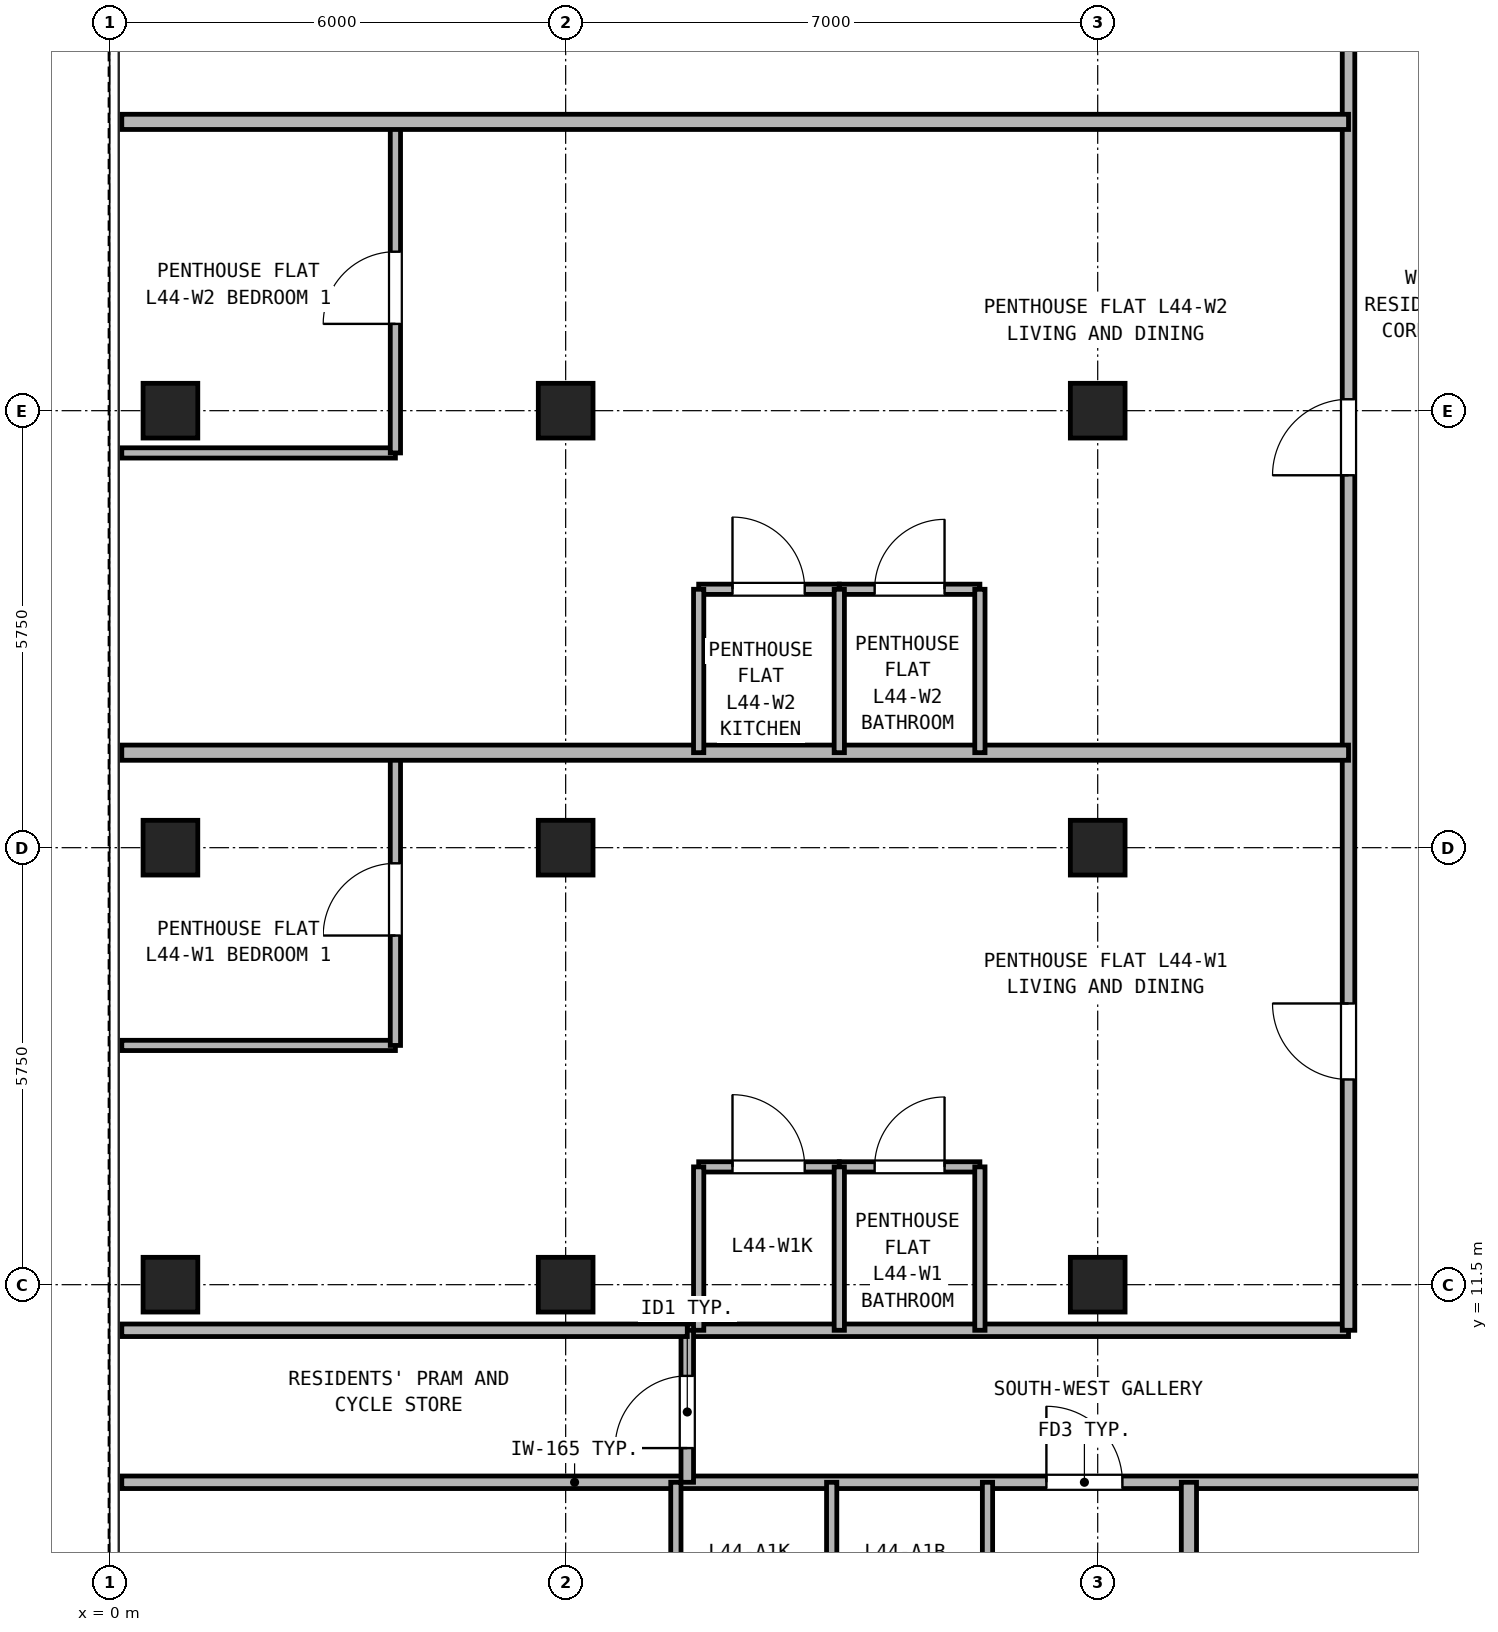
"""IFC4 building model, lengths in metres.
Left out: names, types, materials, properties, quantities, classifications, styles, units other than length and angle.
Written with IfcOpenShell. Run it as: python <this file> out.ifc"""

import sys

from ifc_helpers import new_model, si_unit, direction, frame, frame_2d, origin, origin_2d, place, context, subcontext, project, spatial, rectangle, hollow_rectangle, extrude, source, transform, mapped, element, fill, save


model = new_model("IFC4")
c1 = context("Model", 3, precision=1e-05, world=origin(), true_north=direction((0.0, 1.0)))
c2 = subcontext(c1, "Body", "Model", "MODEL_VIEW")
j1 = project(units=[si_unit("LENGTHUNIT", "METRE"), si_unit("PLANEANGLEUNIT", "RADIAN")], contexts=[c1])
p1 = place(None, origin())
s1 = spatial("IfcSite", under=j1, at=p1, CompositionType="ELEMENT")
p2 = place(p1, origin())
s2 = spatial("IfcBuilding", under=s1, at=p2, CompositionType="ELEMENT")
p3 = place(p2, frame((0.0, 0.0, 159.3)))
s3 = spatial("IfcBuildingStorey", under=s2, at=p3, CompositionType="ELEMENT", Elevation=159.3)
m1 = source(origin(), c2, "Body", "SweptSolid", [
    extrude(hollow_rectangle(XDim=0.72, YDim=0.72, WallThickness=0.04, at=origin_2d()), origin(), (0.0, 0.0, 1.0), 2.95),
])
for number, where, z_axis, x_axis in (
    (1, (0.8, 11.5, 0.0), (0.0, 0.0, 1.0), (1.0, 0.0, 0.0)),
    (2, (0.8, 17.25, 0.0), (0.0, 0.0, 1.0), (1.0, 0.0, 0.0)),
    (3, (0.8, 23.0, 0.0), (0.0, 0.0, 1.0), (1.0, 0.0, 0.0)),
    (4, (6.0, 11.5, 0.0), (0.0, 0.0, 1.0), (1.0, 0.0, 0.0)),
    (5, (6.0, 17.25, 0.0), (0.0, 0.0, 1.0), (1.0, 0.0, 0.0)),
    (6, (6.0, 23.0, 0.0), (0.0, 0.0, 1.0), (1.0, 0.0, 0.0)),
    (7, (13.0, 11.5, 0.0), (0.0, 0.0, 1.0), (1.0, 0.0, 0.0)),
    (8, (13.0, 17.25, 0.0), (0.0, 0.0, 1.0), (1.0, 0.0, 0.0)),
    (9, (13.0, 23.0, 0.0), (0.0, 0.0, 1.0), (1.0, 0.0, 0.0)),
):
    element("IfcColumn", number, at=place(p3, frame(where, z_axis=z_axis, x_axis=x_axis)), inside=s3, PredefinedType="COLUMN", context=c2, shape_type="MappedRepresentation", body=[
        mapped(m1, transform((0.0, 0.0, 0.0), x_axis=(1.0, 0.0, 0.0), y_axis=(0.0, 1.0, 0.0), z_axis=(0.0, 0.0, 1.0), scale=1.0)),
    ])
p4 = place(p3, frame((0.16, 8.9, 0.0), z_axis=(0.0, 0.0, 1.0), x_axis=(1.0, 0.0, 0.0)))
e10 = element("IfcWall", 10, at=p4, inside=s3, PredefinedType="PARTITIONING", context=c2, shape_type="SweptSolid", body=[
    extrude(rectangle(XDim=41.48, YDim=0.165, at=frame_2d((20.74, 0.0))), origin(), (0.0, 0.0, 1.0), 2.95),
])
p5 = place(p4, frame((12.165, 0.0, 0.0)))
e11 = element("IfcOpeningElement", 11, at=p5, cuts=e10, PredefinedType="OPENING", context=c2, shape_type="SweptSolid", body=[
    extrude(rectangle(XDim=1.0, YDim=2.15, at=frame_2d((0.5, 1.075))), frame((0.0, 0.093, 0.0), z_axis=(0.0, -1.0, 0.0), x_axis=(1.0, 0.0, 0.0)), (0.0, 0.0, 1.0), 0.185),
])
p6 = place(p4, frame((17.965, 0.0, 0.0)))
e12 = element("IfcOpeningElement", 12, at=p6, cuts=e10, PredefinedType="OPENING", context=c2, shape_type="SweptSolid", body=[
    extrude(rectangle(XDim=1.0, YDim=2.15, at=frame_2d((0.5, 1.075))), frame((0.0, 0.093, 0.0), z_axis=(0.0, -1.0, 0.0), x_axis=(1.0, 0.0, 0.0)), (0.0, 0.0, 1.0), 0.185),
])
p7 = place(p4, frame((31.115, 0.0, 0.0)))
e13 = element("IfcOpeningElement", 13, at=p7, cuts=e10, PredefinedType="OPENING", context=c2, shape_type="SweptSolid", body=[
    extrude(rectangle(XDim=1.0, YDim=2.15, at=frame_2d((0.5, 1.075))), frame((0.0, 0.093, 0.0), z_axis=(0.0, -1.0, 0.0), x_axis=(1.0, 0.0, 0.0)), (0.0, 0.0, 1.0), 0.185),
])
p8 = place(p3, frame((7.6, 10.9, 0.0), z_axis=(0.0, 0.0, 1.0), x_axis=(1.0, 0.0, 0.0)))
e14 = element("IfcWall", 14, at=p8, inside=s3, PredefinedType="PARTITIONING", context=c2, shape_type="SweptSolid", body=[
    extrude(rectangle(XDim=8.7, YDim=0.165, at=frame_2d((4.35, 0.0))), origin(), (0.0, 0.0, 1.0), 2.95),
])
p9 = place(p3, frame((7.6, 8.9, 0.0), z_axis=(0.0, 0.0, 1.0), x_axis=(0.0, 1.0, 0.0)))
e15 = element("IfcWall", 15, at=p9, inside=s3, PredefinedType="PARTITIONING", context=c2, shape_type="SweptSolid", body=[
    extrude(rectangle(XDim=2.0, YDim=0.165, at=frame_2d((1.0, 0.0))), origin(), (0.0, 0.0, 1.0), 2.95),
])
p10 = place(p9, frame((0.45, 0.0, 0.0)))
e16 = element("IfcOpeningElement", 16, at=p10, cuts=e15, PredefinedType="OPENING", context=c2, shape_type="SweptSolid", body=[
    extrude(rectangle(XDim=0.95, YDim=2.15, at=frame_2d((0.475, 1.075))), frame((0.0, 0.093, 0.0), z_axis=(0.0, -1.0, 0.0), x_axis=(1.0, 0.0, 0.0)), (0.0, 0.0, 1.0), 0.185),
])
p11 = place(p3, frame((16.3, 10.9, 0.0), z_axis=(0.0, 0.0, 1.0), x_axis=(0.0, 1.0, 0.0)))
e17 = element("IfcWall", 17, at=p11, inside=s3, PredefinedType="PARTITIONING", context=c2, shape_type="SweptSolid", body=[
    extrude(rectangle(XDim=24.24, YDim=0.165, at=frame_2d((12.12, 0.0))), origin(), (0.0, 0.0, 1.0), 2.95),
])
p12 = place(p11, frame((3.3, 0.0, 0.0)))
e18 = element("IfcOpeningElement", 18, at=p12, cuts=e17, PredefinedType="OPENING", context=c2, shape_type="SweptSolid", body=[
    extrude(rectangle(XDim=1.0, YDim=2.15, at=frame_2d((0.5, 1.075))), frame((0.0, 0.093, 0.0), z_axis=(0.0, -1.0, 0.0), x_axis=(1.0, 0.0, 0.0)), (0.0, 0.0, 1.0), 0.185),
])
p13 = place(p11, frame((11.25, 0.0, 0.0)))
e19 = element("IfcOpeningElement", 19, at=p13, cuts=e17, PredefinedType="OPENING", context=c2, shape_type="SweptSolid", body=[
    extrude(rectangle(XDim=1.0, YDim=2.15, at=frame_2d((0.5, 1.075))), frame((0.0, 0.093, 0.0), z_axis=(0.0, -1.0, 0.0), x_axis=(1.0, 0.0, 0.0)), (0.0, 0.0, 1.0), 0.185),
])
p14 = place(p11, frame((17.2, 0.0, 0.0)))
e20 = element("IfcOpeningElement", 20, at=p14, cuts=e17, PredefinedType="OPENING", context=c2, shape_type="SweptSolid", body=[
    extrude(rectangle(XDim=1.0, YDim=2.15, at=frame_2d((0.5, 1.075))), frame((0.0, 0.093, 0.0), z_axis=(0.0, -1.0, 0.0), x_axis=(1.0, 0.0, 0.0)), (0.0, 0.0, 1.0), 0.185),
])
for number, where, z_axis, x_axis in (
    (21, (7.45, 6.75, 0.0), (0.0, 0.0, 1.0), (0.0, 1.0, 0.0)),
    (22, (9.5, 6.75, 0.0), (0.0, 0.0, 1.0), (0.0, 1.0, 0.0)),
    (23, (11.55, 6.75, 0.0), (0.0, 0.0, 1.0), (0.0, 1.0, 0.0)),
):
    element("IfcWall", number, at=place(p3, frame(where, z_axis=z_axis, x_axis=x_axis)), inside=s3, PredefinedType="PARTITIONING", context=c2, shape_type="SweptSolid", body=[
        extrude(rectangle(XDim=2.15, YDim=0.135, at=frame_2d((1.075, 0.0))), origin(), (0.0, 0.0, 1.0), 2.95),
    ])
p15 = place(p3, frame((14.2, 0.16, 0.0), z_axis=(0.0, 0.0, 1.0), x_axis=(0.0, 1.0, 0.0)))
e24 = element("IfcWall", 24, at=p15, inside=s3, PredefinedType="PARTITIONING", context=c2, shape_type="SweptSolid", body=[
    extrude(rectangle(XDim=8.74, YDim=0.2, at=frame_2d((4.37, 0.0))), origin(), (0.0, 0.0, 1.0), 2.95),
])
p16 = place(p3, frame((0.16, 10.9, 0.0), z_axis=(0.0, 0.0, 1.0), x_axis=(1.0, 0.0, 0.0)))
e25 = element("IfcWall", 25, at=p16, inside=s3, PredefinedType="PARTITIONING", context=c2, shape_type="SweptSolid", body=[
    extrude(rectangle(XDim=7.44, YDim=0.165, at=frame_2d((3.72, 0.0))), origin(), (0.0, 0.0, 1.0), 2.95),
])
p17 = place(p3, frame((7.75, 13.05, 0.0), z_axis=(0.0, 0.0, 1.0), x_axis=(1.0, 0.0, 0.0)))
e26 = element("IfcWall", 26, at=p17, inside=s3, PredefinedType="PARTITIONING", context=c2, shape_type="SweptSolid", body=[
    extrude(rectangle(XDim=1.85, YDim=0.135, at=frame_2d((0.925, 0.0))), origin(), (0.0, 0.0, 1.0), 2.95),
])
p18 = place(p17, frame((0.445, 0.0, 0.0)))
e27 = element("IfcOpeningElement", 27, at=p18, cuts=e26, PredefinedType="OPENING", context=c2, shape_type="SweptSolid", body=[
    extrude(rectangle(XDim=0.95, YDim=2.15, at=frame_2d((0.475, 1.075))), frame((0.0, 0.077, 0.0), z_axis=(0.0, -1.0, 0.0), x_axis=(1.0, 0.0, 0.0)), (0.0, 0.0, 1.0), 0.155),
])
p19 = place(p3, frame((9.6, 13.05, 0.0), z_axis=(0.0, 0.0, 1.0), x_axis=(1.0, 0.0, 0.0)))
e28 = element("IfcWall", 28, at=p19, inside=s3, PredefinedType="PARTITIONING", context=c2, shape_type="SweptSolid", body=[
    extrude(rectangle(XDim=1.85, YDim=0.135, at=frame_2d((0.925, 0.0))), origin(), (0.0, 0.0, 1.0), 2.95),
])
p20 = place(p19, frame((0.465, 0.0, 0.0)))
e29 = element("IfcOpeningElement", 29, at=p20, cuts=e28, PredefinedType="OPENING", context=c2, shape_type="SweptSolid", body=[
    extrude(rectangle(XDim=0.92, YDim=2.1, at=frame_2d((0.46, 1.05))), frame((0.0, 0.077, 0.0), z_axis=(0.0, -1.0, 0.0), x_axis=(1.0, 0.0, 0.0)), (0.0, 0.0, 1.0), 0.155),
])
for number, where, z_axis, x_axis in (
    (30, (7.75, 10.9, 0.0), (0.0, 0.0, 1.0), (0.0, 1.0, 0.0)),
    (31, (9.6, 10.9, 0.0), (0.0, 0.0, 1.0), (0.0, 1.0, 0.0)),
    (32, (11.45, 10.9, 0.0), (0.0, 0.0, 1.0), (0.0, 1.0, 0.0)),
):
    element("IfcWall", number, at=place(p3, frame(where, z_axis=z_axis, x_axis=x_axis)), inside=s3, PredefinedType="PARTITIONING", context=c2, shape_type="SweptSolid", body=[
        extrude(rectangle(XDim=2.15, YDim=0.135, at=frame_2d((1.075, 0.0))), origin(), (0.0, 0.0, 1.0), 2.95),
    ])
p21 = place(p3, frame((0.16, 14.648, 0.0), z_axis=(0.0, 0.0, 1.0), x_axis=(1.0, 0.0, 0.0)))
e33 = element("IfcWall", 33, at=p21, inside=s3, PredefinedType="PARTITIONING", context=c2, shape_type="SweptSolid", body=[
    extrude(rectangle(XDim=3.6, YDim=0.135, at=frame_2d((1.8, 0.0))), origin(), (0.0, 0.0, 1.0), 2.95),
])
p22 = place(p3, frame((3.76, 14.648, 0.0), z_axis=(0.0, 0.0, 1.0), x_axis=(0.0, 1.0, 0.0)))
e34 = element("IfcWall", 34, at=p22, inside=s3, PredefinedType="PARTITIONING", context=c2, shape_type="SweptSolid", body=[
    extrude(rectangle(XDim=3.852, YDim=0.135, at=frame_2d((1.926, 0.0))), origin(), (0.0, 0.0, 1.0), 2.95),
])
p23 = place(p22, frame((1.446, 0.0, 0.0)))
e35 = element("IfcOpeningElement", 35, at=p23, cuts=e34, PredefinedType="OPENING", context=c2, shape_type="SweptSolid", body=[
    extrude(rectangle(XDim=0.95, YDim=2.15, at=frame_2d((0.475, 1.075))), frame((0.0, 0.077, 0.0), z_axis=(0.0, -1.0, 0.0), x_axis=(1.0, 0.0, 0.0)), (0.0, 0.0, 1.0), 0.155),
])
p24 = place(p3, frame((0.16, 18.5, 0.0), z_axis=(0.0, 0.0, 1.0), x_axis=(1.0, 0.0, 0.0)))
e36 = element("IfcWall", 36, at=p24, inside=s3, PredefinedType="PARTITIONING", context=c2, shape_type="SweptSolid", body=[
    extrude(rectangle(XDim=16.14, YDim=0.2, at=frame_2d((8.07, 0.0))), origin(), (0.0, 0.0, 1.0), 2.95),
])
p25 = place(p3, frame((7.75, 20.65, 0.0), z_axis=(0.0, 0.0, 1.0), x_axis=(1.0, 0.0, 0.0)))
e37 = element("IfcWall", 37, at=p25, inside=s3, PredefinedType="PARTITIONING", context=c2, shape_type="SweptSolid", body=[
    extrude(rectangle(XDim=1.85, YDim=0.135, at=frame_2d((0.925, 0.0))), origin(), (0.0, 0.0, 1.0), 2.95),
])
p26 = place(p25, frame((0.445, 0.0, 0.0)))
e38 = element("IfcOpeningElement", 38, at=p26, cuts=e37, PredefinedType="OPENING", context=c2, shape_type="SweptSolid", body=[
    extrude(rectangle(XDim=0.95, YDim=2.15, at=frame_2d((0.475, 1.075))), frame((0.0, 0.077, 0.0), z_axis=(0.0, -1.0, 0.0), x_axis=(1.0, 0.0, 0.0)), (0.0, 0.0, 1.0), 0.155),
])
p27 = place(p3, frame((9.6, 20.65, 0.0), z_axis=(0.0, 0.0, 1.0), x_axis=(1.0, 0.0, 0.0)))
e39 = element("IfcWall", 39, at=p27, inside=s3, PredefinedType="PARTITIONING", context=c2, shape_type="SweptSolid", body=[
    extrude(rectangle(XDim=1.85, YDim=0.135, at=frame_2d((0.925, 0.0))), origin(), (0.0, 0.0, 1.0), 2.95),
])
p28 = place(p27, frame((0.465, 0.0, 0.0)))
e40 = element("IfcOpeningElement", 40, at=p28, cuts=e39, PredefinedType="OPENING", context=c2, shape_type="SweptSolid", body=[
    extrude(rectangle(XDim=0.92, YDim=2.1, at=frame_2d((0.46, 1.05))), frame((0.0, 0.077, 0.0), z_axis=(0.0, -1.0, 0.0), x_axis=(1.0, 0.0, 0.0)), (0.0, 0.0, 1.0), 0.155),
])
for number, where, z_axis, x_axis in (
    (41, (7.75, 18.5, 0.0), (0.0, 0.0, 1.0), (0.0, 1.0, 0.0)),
    (42, (9.6, 18.5, 0.0), (0.0, 0.0, 1.0), (0.0, 1.0, 0.0)),
    (43, (11.45, 18.5, 0.0), (0.0, 0.0, 1.0), (0.0, 1.0, 0.0)),
):
    element("IfcWall", number, at=place(p3, frame(where, z_axis=z_axis, x_axis=x_axis)), inside=s3, PredefinedType="PARTITIONING", context=c2, shape_type="SweptSolid", body=[
        extrude(rectangle(XDim=2.15, YDim=0.135, at=frame_2d((1.075, 0.0))), origin(), (0.0, 0.0, 1.0), 2.95),
    ])
p29 = place(p3, frame((0.16, 22.444, 0.0), z_axis=(0.0, 0.0, 1.0), x_axis=(1.0, 0.0, 0.0)))
e44 = element("IfcWall", 44, at=p29, inside=s3, PredefinedType="PARTITIONING", context=c2, shape_type="SweptSolid", body=[
    extrude(rectangle(XDim=3.6, YDim=0.135, at=frame_2d((1.8, 0.0))), origin(), (0.0, 0.0, 1.0), 2.95),
])
p30 = place(p3, frame((3.76, 22.444, 0.0), z_axis=(0.0, 0.0, 1.0), x_axis=(0.0, 1.0, 0.0)))
e45 = element("IfcWall", 45, at=p30, inside=s3, PredefinedType="PARTITIONING", context=c2, shape_type="SweptSolid", body=[
    extrude(rectangle(XDim=4.356, YDim=0.135, at=frame_2d((2.178, 0.0))), origin(), (0.0, 0.0, 1.0), 2.95),
])
p31 = place(p30, frame((1.698, 0.0, 0.0)))
e46 = element("IfcOpeningElement", 46, at=p31, cuts=e45, PredefinedType="OPENING", context=c2, shape_type="SweptSolid", body=[
    extrude(rectangle(XDim=0.95, YDim=2.15, at=frame_2d((0.475, 1.075))), frame((0.0, 0.077, 0.0), z_axis=(0.0, -1.0, 0.0), x_axis=(1.0, 0.0, 0.0)), (0.0, 0.0, 1.0), 0.155),
])
p32 = place(p3, frame((0.16, 26.8, 0.0), z_axis=(0.0, 0.0, 1.0), x_axis=(1.0, 0.0, 0.0)))
e47 = element("IfcWall", 47, at=p32, inside=s3, PredefinedType="PARTITIONING", context=c2, shape_type="SweptSolid", body=[
    extrude(rectangle(XDim=16.14, YDim=0.2, at=frame_2d((8.07, 0.0))), origin(), (0.0, 0.0, 1.0), 2.95),
])
p33 = place(p5, frame((1.0, 0.0, 0.0), z_axis=(0.0, 0.0, 1.0), x_axis=(-1.0, 0.0, 0.0)))
e48 = element("IfcDoor", 48, at=p33, inside=s3, OperationType="SINGLE_SWING_LEFT", PredefinedType="DOOR", context=c2, shape_type="SweptSolid", body=[
    extrude(rectangle(XDim=1.0, YDim=2.15, at=frame_2d((0.5, 1.075))), frame((0.0, 0.025, 0.0), z_axis=(0.0, -1.0, 0.0), x_axis=(1.0, 0.0, 0.0)), (0.0, 0.0, 1.0), 0.05),
])
fill(e11, e48)
p34 = place(p10, frame((0.95, 0.0, 0.0), z_axis=(0.0, 0.0, 1.0), x_axis=(-1.0, 0.0, 0.0)))
e49 = element("IfcDoor", 49, at=p34, inside=s3, OperationType="SINGLE_SWING_LEFT", PredefinedType="DOOR", context=c2, shape_type="SweptSolid", body=[
    extrude(rectangle(XDim=0.95, YDim=2.15, at=frame_2d((0.475, 1.075))), frame((0.0, 0.025, 0.0), z_axis=(0.0, -1.0, 0.0), x_axis=(1.0, 0.0, 0.0)), (0.0, 0.0, 1.0), 0.05),
])
fill(e16, e49)
p35 = place(p18, origin())
e50 = element("IfcDoor", 50, at=p35, inside=s3, OperationType="SINGLE_SWING_LEFT", PredefinedType="DOOR", context=c2, shape_type="SweptSolid", body=[
    extrude(rectangle(XDim=0.95, YDim=2.15, at=frame_2d((0.475, 1.075))), frame((0.0, 0.025, 0.0), z_axis=(0.0, -1.0, 0.0), x_axis=(1.0, 0.0, 0.0)), (0.0, 0.0, 1.0), 0.05),
])
fill(e27, e50)
p36 = place(p20, origin())
e51 = element("IfcDoor", 51, at=p36, inside=s3, OperationType="SINGLE_SWING_RIGHT", PredefinedType="DOOR", context=c2, shape_type="SweptSolid", body=[
    extrude(rectangle(XDim=0.92, YDim=2.1, at=frame_2d((0.46, 1.05))), frame((0.0, 0.025, 0.0), z_axis=(0.0, -1.0, 0.0), x_axis=(1.0, 0.0, 0.0)), (0.0, 0.0, 1.0), 0.05),
])
fill(e29, e51)
p37 = place(p23, origin())
e52 = element("IfcDoor", 52, at=p37, inside=s3, OperationType="SINGLE_SWING_LEFT", PredefinedType="DOOR", context=c2, shape_type="SweptSolid", body=[
    extrude(rectangle(XDim=0.95, YDim=2.15, at=frame_2d((0.475, 1.075))), frame((0.0, 0.025, 0.0), z_axis=(0.0, -1.0, 0.0), x_axis=(1.0, 0.0, 0.0)), (0.0, 0.0, 1.0), 0.05),
])
fill(e35, e52)
p38 = place(p12, origin())
e53 = element("IfcDoor", 53, at=p38, inside=s3, OperationType="SINGLE_SWING_RIGHT", PredefinedType="DOOR", context=c2, shape_type="SweptSolid", body=[
    extrude(rectangle(XDim=1.0, YDim=2.15, at=frame_2d((0.5, 1.075))), frame((0.0, 0.025, 0.0), z_axis=(0.0, -1.0, 0.0), x_axis=(1.0, 0.0, 0.0)), (0.0, 0.0, 1.0), 0.05),
])
fill(e18, e53)
p39 = place(p26, origin())
e54 = element("IfcDoor", 54, at=p39, inside=s3, OperationType="SINGLE_SWING_LEFT", PredefinedType="DOOR", context=c2, shape_type="SweptSolid", body=[
    extrude(rectangle(XDim=0.95, YDim=2.15, at=frame_2d((0.475, 1.075))), frame((0.0, 0.025, 0.0), z_axis=(0.0, -1.0, 0.0), x_axis=(1.0, 0.0, 0.0)), (0.0, 0.0, 1.0), 0.05),
])
fill(e38, e54)
p40 = place(p28, origin())
e55 = element("IfcDoor", 55, at=p40, inside=s3, OperationType="SINGLE_SWING_RIGHT", PredefinedType="DOOR", context=c2, shape_type="SweptSolid", body=[
    extrude(rectangle(XDim=0.92, YDim=2.1, at=frame_2d((0.46, 1.05))), frame((0.0, 0.025, 0.0), z_axis=(0.0, -1.0, 0.0), x_axis=(1.0, 0.0, 0.0)), (0.0, 0.0, 1.0), 0.05),
])
fill(e40, e55)
p41 = place(p31, origin())
e56 = element("IfcDoor", 56, at=p41, inside=s3, OperationType="SINGLE_SWING_LEFT", PredefinedType="DOOR", context=c2, shape_type="SweptSolid", body=[
    extrude(rectangle(XDim=0.95, YDim=2.15, at=frame_2d((0.475, 1.075))), frame((0.0, 0.025, 0.0), z_axis=(0.0, -1.0, 0.0), x_axis=(1.0, 0.0, 0.0)), (0.0, 0.0, 1.0), 0.05),
])
fill(e46, e56)
p42 = place(p13, origin())
e57 = element("IfcDoor", 57, at=p42, inside=s3, OperationType="SINGLE_SWING_LEFT", PredefinedType="DOOR", context=c2, shape_type="SweptSolid", body=[
    extrude(rectangle(XDim=1.0, YDim=2.15, at=frame_2d((0.5, 1.075))), frame((0.0, 0.025, 0.0), z_axis=(0.0, -1.0, 0.0), x_axis=(1.0, 0.0, 0.0)), (0.0, 0.0, 1.0), 0.05),
])
fill(e19, e57)
save(model, sys.argv[1])
